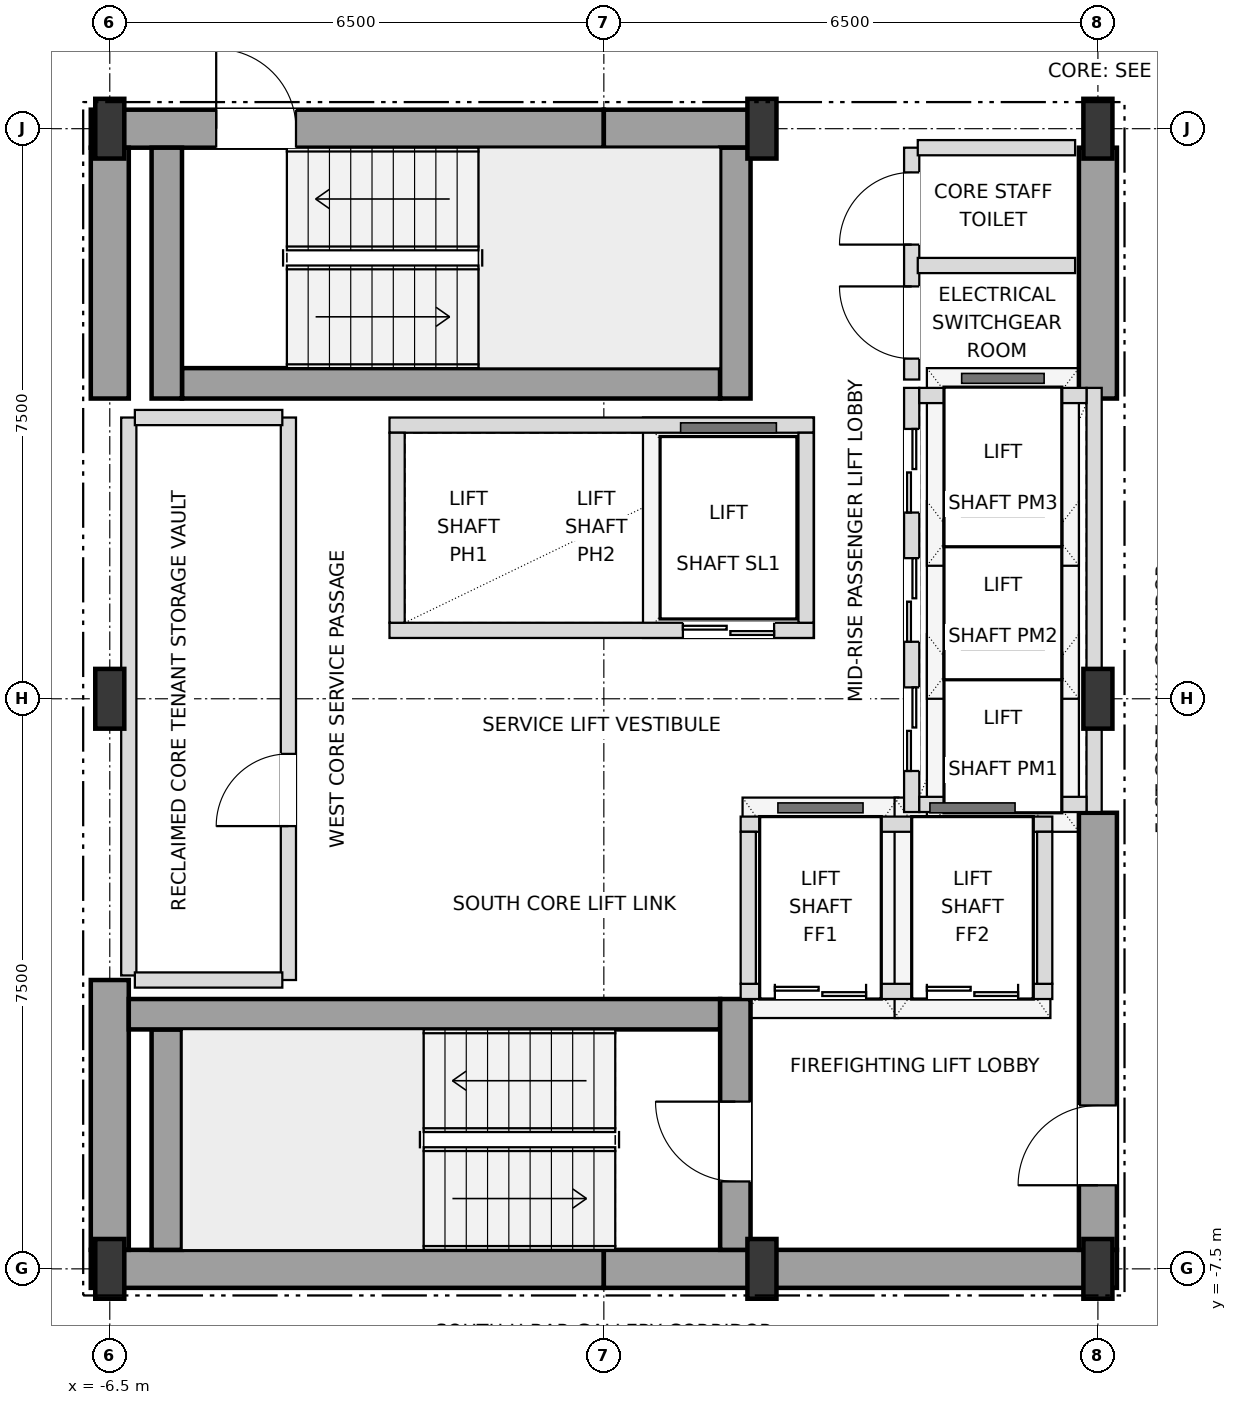
"""IFC4 building model, lengths in metres.
Left out: names, types, materials, properties, quantities, classifications, styles, units other than length and angle.
Written with IfcOpenShell. Run it as: python <this file> out.ifc"""

import sys

from ifc_helpers import new_model, si_unit, direction, frame, frame_2d, origin, origin_2d, place, context, subcontext, project, spatial, rectangle, i_section, extrude, element, fill, save


model = new_model("IFC4")
c1 = context("Model", 3, precision=1e-05, world=origin(), true_north=direction((0.0, 1.0)))
c2 = subcontext(c1, "Body", "Model", "MODEL_VIEW")
j1 = project(units=[si_unit("LENGTHUNIT", "METRE"), si_unit("PLANEANGLEUNIT", "RADIAN")], contexts=[c1])
p1 = place(None, origin())
s1 = spatial("IfcSite", under=j1, at=p1, CompositionType="ELEMENT")
p2 = place(p1, origin())
s2 = spatial("IfcBuilding", under=s1, at=p2, CompositionType="ELEMENT")
p3 = place(p2, frame((0.0, 0.0, 208.8)))
s3 = spatial("IfcBuildingStorey", under=s2, at=p3, CompositionType="ELEMENT", Elevation=208.8)
for number, where, z_axis, x_axis in (
    (1, (-6.5, -7.5, 0.0), (0.0, 0.0, 1.0), (1.0, 0.0, 0.0)),
    (2, (2.08, -7.5, 0.0), (0.0, 0.0, 1.0), (1.0, 0.0, 0.0)),
    (3, (6.5, -7.5, 0.0), (0.0, 0.0, 1.0), (1.0, 0.0, 0.0)),
    (4, (-6.5, 0.0, 0.0), (0.0, 0.0, 1.0), (1.0, 0.0, 0.0)),
    (5, (6.5, 0.0, 0.0), (0.0, 0.0, 1.0), (1.0, 0.0, 0.0)),
    (6, (-6.5, 7.5, 0.0), (0.0, 0.0, 1.0), (1.0, 0.0, 0.0)),
    (7, (2.08, 7.5, 0.0), (0.0, 0.0, 1.0), (1.0, 0.0, 0.0)),
    (8, (6.5, 7.5, 0.0), (0.0, 0.0, 1.0), (1.0, 0.0, 0.0)),
):
    element("IfcColumn", number, at=place(p3, frame(where, z_axis=z_axis, x_axis=x_axis)), inside=s3, PredefinedType="COLUMN", context=c2, shape_type="SweptSolid", body=[
        extrude(i_section(OverallWidth=0.382, OverallDepth=0.786, WebThickness=0.02, FlangeThickness=0.033, at=origin_2d()), origin(), (0.0, 0.0, 1.0), 3.6),
    ])
for number, where, z_axis, x_axis in (
    (9, (-6.75, -7.5, 0.0), (0.0, 0.0, 1.0), (1.0, 0.0, 0.0)),
    (10, (0.0, -7.5, 0.0), (0.0, 0.0, 1.0), (1.0, 0.0, 0.0)),
):
    element("IfcWall", number, at=place(p3, frame(where, z_axis=z_axis, x_axis=x_axis)), inside=s3, PredefinedType="SHEAR", context=c2, shape_type="SweptSolid", body=[
        extrude(rectangle(XDim=6.75, YDim=0.5, at=frame_2d((3.375, 0.0))), origin(), (0.0, 0.0, 1.0), 3.3),
    ])
p4 = place(p3, frame((-6.75, 7.5, 0.0), z_axis=(0.0, 0.0, 1.0), x_axis=(1.0, 0.0, 0.0)))
e11 = element("IfcWall", 11, at=p4, inside=s3, PredefinedType="SHEAR", context=c2, shape_type="SweptSolid", body=[
    extrude(rectangle(XDim=6.75, YDim=0.5, at=frame_2d((3.375, 0.0))), origin(), (0.0, 0.0, 1.0), 3.3),
])
p5 = place(p4, frame((1.65, 0.0, 0.0)))
e12 = element("IfcOpeningElement", 12, at=p5, cuts=e11, PredefinedType="OPENING", context=c2, shape_type="SweptSolid", body=[
    extrude(rectangle(XDim=1.05, YDim=2.15, at=frame_2d((0.525, 1.075))), frame((0.0, 0.26, 0.0), z_axis=(0.0, -1.0, 0.0), x_axis=(1.0, 0.0, 0.0)), (0.0, 0.0, 1.0), 0.52),
])
p6 = place(p3, frame((0.0, 7.5, 0.0), z_axis=(0.0, 0.0, 1.0), x_axis=(1.0, 0.0, 0.0)))
e13 = element("IfcWall", 13, at=p6, inside=s3, PredefinedType="SHEAR", context=c2, shape_type="SweptSolid", body=[
    extrude(rectangle(XDim=2.08, YDim=0.5, at=frame_2d((1.04, 0.0))), origin(), (0.0, 0.0, 1.0), 3.3),
])
p7 = place(p3, frame((-6.5, -7.25, 0.0), z_axis=(0.0, 0.0, 1.0), x_axis=(0.0, 1.0, 0.0)))
e14 = element("IfcWall", 14, at=p7, inside=s3, PredefinedType="SHEAR", context=c2, shape_type="SweptSolid", body=[
    extrude(rectangle(XDim=3.55, YDim=0.5, at=frame_2d((1.775, 0.0))), origin(), (0.0, 0.0, 1.0), 3.3),
])
p8 = place(p3, frame((-6.5, 3.95, 0.0), z_axis=(0.0, 0.0, 1.0), x_axis=(0.0, 1.0, 0.0)))
e15 = element("IfcWall", 15, at=p8, inside=s3, PredefinedType="SHEAR", context=c2, shape_type="SweptSolid", body=[
    extrude(rectangle(XDim=3.3, YDim=0.5, at=frame_2d((1.65, 0.0))), origin(), (0.0, 0.0, 1.0), 3.3),
])
p9 = place(p3, frame((6.5, -7.25, 0.0), z_axis=(0.0, 0.0, 1.0), x_axis=(0.0, 1.0, 0.0)))
e16 = element("IfcWall", 16, at=p9, inside=s3, PredefinedType="SHEAR", context=c2, shape_type="SweptSolid", body=[
    extrude(rectangle(XDim=5.75, YDim=0.5, at=frame_2d((2.875, 0.0))), origin(), (0.0, 0.0, 1.0), 3.3),
])
p10 = place(p9, frame((0.85, 0.0, 0.0)))
e17 = element("IfcOpeningElement", 17, at=p10, cuts=e16, PredefinedType="OPENING", context=c2, shape_type="SweptSolid", body=[
    extrude(rectangle(XDim=1.05, YDim=2.15, at=frame_2d((0.525, 1.075))), frame((0.0, 0.26, 0.0), z_axis=(0.0, -1.0, 0.0), x_axis=(1.0, 0.0, 0.0)), (0.0, 0.0, 1.0), 0.52),
])
p11 = place(p3, frame((6.5, 3.95, 0.0), z_axis=(0.0, 0.0, 1.0), x_axis=(0.0, 1.0, 0.0)))
e18 = element("IfcWall", 18, at=p11, inside=s3, PredefinedType="SHEAR", context=c2, shape_type="SweptSolid", body=[
    extrude(rectangle(XDim=3.3, YDim=0.5, at=frame_2d((1.65, 0.0))), origin(), (0.0, 0.0, 1.0), 3.3),
])
p12 = place(p3, frame((-5.75, -7.25, 0.0), z_axis=(0.0, 0.0, 1.0), x_axis=(0.0, 1.0, 0.0)))
e19 = element("IfcWall", 19, at=p12, inside=s3, PredefinedType="SHEAR", context=c2, shape_type="SweptSolid", body=[
    extrude(rectangle(XDim=2.9, YDim=0.4, at=frame_2d((1.45, 0.0))), origin(), (0.0, 0.0, 1.0), 3.3),
])
p13 = place(p3, frame((-6.25, -4.15, 0.0), z_axis=(0.0, 0.0, 1.0), x_axis=(1.0, 0.0, 0.0)))
e20 = element("IfcWall", 20, at=p13, inside=s3, PredefinedType="SHEAR", context=c2, shape_type="SweptSolid", body=[
    extrude(rectangle(XDim=7.78, YDim=0.4, at=frame_2d((3.89, 0.0))), origin(), (0.0, 0.0, 1.0), 3.3),
])
p14 = place(p3, frame((1.73, -7.25, 0.0), z_axis=(0.0, 0.0, 1.0), x_axis=(0.0, 1.0, 0.0)))
e21 = element("IfcWall", 21, at=p14, inside=s3, PredefinedType="SHEAR", context=c2, shape_type="SweptSolid", body=[
    extrude(rectangle(XDim=3.3, YDim=0.4, at=frame_2d((1.65, 0.0))), origin(), (0.0, 0.0, 1.0), 3.3),
])
p15 = place(p14, frame((0.9, 0.0, 0.0)))
e22 = element("IfcOpeningElement", 22, at=p15, cuts=e21, PredefinedType="OPENING", context=c2, shape_type="SweptSolid", body=[
    extrude(rectangle(XDim=1.05, YDim=2.15, at=frame_2d((0.525, 1.075))), frame((0.0, 0.21, 0.0), z_axis=(0.0, -1.0, 0.0), x_axis=(1.0, 0.0, 0.0)), (0.0, 0.0, 1.0), 0.42),
])
p16 = place(p3, frame((-5.55, 4.15, 0.0), z_axis=(0.0, 0.0, 1.0), x_axis=(1.0, 0.0, 0.0)))
e23 = element("IfcWall", 23, at=p16, inside=s3, PredefinedType="SHEAR", context=c2, shape_type="SweptSolid", body=[
    extrude(rectangle(XDim=7.08, YDim=0.4, at=frame_2d((3.54, 0.0))), origin(), (0.0, 0.0, 1.0), 3.3),
])
for number, where, z_axis, x_axis in (
    (24, (1.73, 3.95, 0.0), (0.0, 0.0, 1.0), (0.0, 1.0, 0.0)),
    (25, (-5.75, 3.95, 0.0), (0.0, 0.0, 1.0), (0.0, 1.0, 0.0)),
):
    element("IfcWall", number, at=place(p3, frame(where, z_axis=z_axis, x_axis=x_axis)), inside=s3, PredefinedType="SHEAR", context=c2, shape_type="SweptSolid", body=[
        extrude(rectangle(XDim=3.3, YDim=0.4, at=frame_2d((1.65, 0.0))), origin(), (0.0, 0.0, 1.0), 3.3),
    ])
p17 = place(p3, frame((4.05, -1.49, 0.0), z_axis=(0.0, 0.0, 1.0), x_axis=(0.0, 1.0, 0.0)))
e26 = element("IfcWall", 26, at=p17, inside=s3, PredefinedType="SOLIDWALL", context=c2, shape_type="SweptSolid", body=[
    extrude(rectangle(XDim=5.58, YDim=0.2, at=frame_2d((2.79, 0.0))), origin(), (0.0, 0.0, 1.0), 3.3),
])
p18 = place(p17, frame((0.54, 0.0, 0.0)))
e27 = element("IfcOpeningElement", 27, at=p18, cuts=e26, PredefinedType="OPENING", context=c2, shape_type="SweptSolid", body=[
    extrude(rectangle(XDim=1.1, YDim=2.15, at=frame_2d((0.55, 1.075))), frame((0.0, 0.11, 0.0), z_axis=(0.0, -1.0, 0.0), x_axis=(1.0, 0.0, 0.0)), (0.0, 0.0, 1.0), 0.22),
])
p19 = place(p17, frame((2.24, 0.0, 0.0)))
e28 = element("IfcOpeningElement", 28, at=p19, cuts=e26, PredefinedType="OPENING", context=c2, shape_type="SweptSolid", body=[
    extrude(rectangle(XDim=1.1, YDim=2.15, at=frame_2d((0.55, 1.075))), frame((0.0, 0.11, 0.0), z_axis=(0.0, -1.0, 0.0), x_axis=(1.0, 0.0, 0.0)), (0.0, 0.0, 1.0), 0.22),
])
p20 = place(p17, frame((3.94, 0.0, 0.0)))
e29 = element("IfcOpeningElement", 29, at=p20, cuts=e26, PredefinedType="OPENING", context=c2, shape_type="SweptSolid", body=[
    extrude(rectangle(XDim=1.1, YDim=2.15, at=frame_2d((0.55, 1.075))), frame((0.0, 0.11, 0.0), z_axis=(0.0, -1.0, 0.0), x_axis=(1.0, 0.0, 0.0)), (0.0, 0.0, 1.0), 0.22),
])
p21 = place(p3, frame((6.45, -1.49, 0.0), z_axis=(0.0, 0.0, 1.0), x_axis=(0.0, 1.0, 0.0)))
e30 = element("IfcWall", 30, at=p21, inside=s3, PredefinedType="SOLIDWALL", context=c2, shape_type="SweptSolid", body=[
    extrude(rectangle(XDim=5.58, YDim=0.2, at=frame_2d((2.79, 0.0))), origin(), (0.0, 0.0, 1.0), 2.746),
])
for number, where, z_axis, x_axis in (
    (31, (4.15, -1.39, 0.0), (0.0, 0.0, 1.0), (1.0, 0.0, 0.0)),
    (32, (4.15, 3.99, 0.0), (0.0, 0.0, 1.0), (1.0, 0.0, 0.0)),
):
    element("IfcWall", number, at=place(p3, frame(where, z_axis=z_axis, x_axis=x_axis)), inside=s3, PredefinedType="SOLIDWALL", context=c2, shape_type="SweptSolid", body=[
        extrude(rectangle(XDim=2.2, YDim=0.2, at=frame_2d((1.1, 0.0))), origin(), (0.0, 0.0, 1.0), 3.3),
    ])
p22 = place(p3, frame((-2.82, 0.9, 0.0), z_axis=(0.0, 0.0, 1.0), x_axis=(1.0, 0.0, 0.0)))
e33 = element("IfcWall", 33, at=p22, inside=s3, PredefinedType="SOLIDWALL", context=c2, shape_type="SweptSolid", body=[
    extrude(rectangle(XDim=5.58, YDim=0.2, at=frame_2d((2.79, 0.0))), origin(), (0.0, 0.0, 1.0), 3.3),
])
p23 = place(p22, frame((3.86, 0.0, 0.0)))
e34 = element("IfcOpeningElement", 34, at=p23, cuts=e33, PredefinedType="OPENING", context=c2, shape_type="SweptSolid", body=[
    extrude(rectangle(XDim=1.2, YDim=2.2, at=frame_2d((0.6, 1.1))), frame((0.0, 0.11, 0.0), z_axis=(0.0, -1.0, 0.0), x_axis=(1.0, 0.0, 0.0)), (0.0, 0.0, 1.0), 0.22),
])
p24 = place(p3, frame((-2.82, 3.6, 0.0), z_axis=(0.0, 0.0, 1.0), x_axis=(1.0, 0.0, 0.0)))
e35 = element("IfcWall", 35, at=p24, inside=s3, PredefinedType="SOLIDWALL", context=c2, shape_type="SweptSolid", body=[
    extrude(rectangle(XDim=5.58, YDim=0.2, at=frame_2d((2.79, 0.0))), origin(), (0.0, 0.0, 1.0), 3.3),
])
for number, where, z_axis, x_axis in (
    (36, (-2.72, 1.0, 0.0), (0.0, 0.0, 1.0), (0.0, 1.0, 0.0)),
    (37, (2.66, 1.0, 0.0), (0.0, 0.0, 1.0), (0.0, 1.0, 0.0)),
):
    element("IfcWall", number, at=place(p3, frame(where, z_axis=z_axis, x_axis=x_axis)), inside=s3, PredefinedType="SOLIDWALL", context=c2, shape_type="SweptSolid", body=[
        extrude(rectangle(XDim=2.5, YDim=0.2, at=frame_2d((1.25, 0.0))), origin(), (0.0, 0.0, 1.0), 3.3),
    ])
p25 = place(p3, frame((1.8, -3.85, 0.0), z_axis=(0.0, 0.0, 1.0), x_axis=(1.0, 0.0, 0.0)))
e38 = element("IfcWall", 38, at=p25, inside=s3, PredefinedType="SOLIDWALL", context=c2, shape_type="SweptSolid", body=[
    extrude(rectangle(XDim=4.1, YDim=0.2, at=frame_2d((2.05, 0.0))), origin(), (0.0, 0.0, 1.0), 3.3),
])
p26 = place(p25, frame((0.45, 0.0, 0.0)))
e39 = element("IfcOpeningElement", 39, at=p26, cuts=e38, PredefinedType="OPENING", context=c2, shape_type="SweptSolid", body=[
    extrude(rectangle(XDim=1.2, YDim=2.2, at=frame_2d((0.6, 1.1))), frame((0.0, 0.11, 0.0), z_axis=(0.0, -1.0, 0.0), x_axis=(1.0, 0.0, 0.0)), (0.0, 0.0, 1.0), 0.22),
])
p27 = place(p25, frame((2.45, 0.0, 0.0)))
e40 = element("IfcOpeningElement", 40, at=p27, cuts=e38, PredefinedType="OPENING", context=c2, shape_type="SweptSolid", body=[
    extrude(rectangle(XDim=1.2, YDim=2.2, at=frame_2d((0.6, 1.1))), frame((0.0, 0.11, 0.0), z_axis=(0.0, -1.0, 0.0), x_axis=(1.0, 0.0, 0.0)), (0.0, 0.0, 1.0), 0.22),
])
p28 = place(p3, frame((1.8, -1.65, 0.0), z_axis=(0.0, 0.0, 1.0), x_axis=(1.0, 0.0, 0.0)))
e41 = element("IfcWall", 41, at=p28, inside=s3, PredefinedType="SOLIDWALL", context=c2, shape_type="SweptSolid", body=[
    extrude(rectangle(XDim=4.1, YDim=0.2, at=frame_2d((2.05, 0.0))), origin(), (0.0, 0.0, 1.0), 3.3),
])
for number, where, z_axis, x_axis in (
    (42, (1.9, -3.75, 0.0), (0.0, 0.0, 1.0), (0.0, 1.0, 0.0)),
    (43, (5.8, -3.75, 0.0), (0.0, 0.0, 1.0), (0.0, 1.0, 0.0)),
):
    element("IfcWall", number, at=place(p3, frame(where, z_axis=z_axis, x_axis=x_axis)), inside=s3, PredefinedType="SOLIDWALL", context=c2, shape_type="SweptSolid", body=[
        extrude(rectangle(XDim=2.0, YDim=0.2, at=frame_2d((1.0, 0.0))), origin(), (0.0, 0.0, 1.0), 3.3),
    ])
p29 = place(p3, frame((-6.25, -3.64, 0.0), z_axis=(0.0, 0.0, 1.0), x_axis=(0.0, 1.0, 0.0)))
e44 = element("IfcWall", 44, at=p29, inside=s3, PredefinedType="SOLIDWALL", context=c2, shape_type="SweptSolid", body=[
    extrude(rectangle(XDim=7.34, YDim=0.2, at=frame_2d((3.67, 0.0))), origin(), (0.0, 0.0, 1.0), 3.3),
])
p30 = place(p3, frame((-4.15, -3.7, 0.0), z_axis=(0.0, 0.0, 1.0), x_axis=(0.0, 1.0, 0.0)))
e45 = element("IfcWall", 45, at=p30, inside=s3, PredefinedType="SOLIDWALL", context=c2, shape_type="SweptSolid", body=[
    extrude(rectangle(XDim=7.4, YDim=0.2, at=frame_2d((3.7, 0.0))), origin(), (0.0, 0.0, 1.0), 3.3),
])
p31 = place(p30, frame((2.025, 0.0, 0.0)))
e46 = element("IfcOpeningElement", 46, at=p31, cuts=e45, PredefinedType="OPENING", context=c2, shape_type="SweptSolid", body=[
    extrude(rectangle(XDim=0.95, YDim=2.15, at=frame_2d((0.475, 1.075))), frame((0.0, 0.11, 0.0), z_axis=(0.0, -1.0, 0.0), x_axis=(1.0, 0.0, 0.0)), (0.0, 0.0, 1.0), 0.22),
])
p32 = place(p3, frame((4.05, 4.2, 0.0), z_axis=(0.0, 0.0, 1.0), x_axis=(0.0, 1.0, 0.0)))
e47 = element("IfcWall", 47, at=p32, inside=s3, PredefinedType="SOLIDWALL", context=c2, shape_type="SweptSolid", body=[
    extrude(rectangle(XDim=3.05, YDim=0.2, at=frame_2d((1.525, 0.0))), origin(), (0.0, 0.0, 1.0), 3.3),
])
p33 = place(p32, frame((0.275, 0.0, 0.0)))
e48 = element("IfcOpeningElement", 48, at=p33, cuts=e47, PredefinedType="OPENING", context=c2, shape_type="SweptSolid", body=[
    extrude(rectangle(XDim=0.95, YDim=2.15, at=frame_2d((0.475, 1.075))), frame((0.0, 0.11, 0.0), z_axis=(0.0, -1.0, 0.0), x_axis=(1.0, 0.0, 0.0)), (0.0, 0.0, 1.0), 0.22),
])
p34 = place(p32, frame((1.775, 0.0, 0.0)))
e49 = element("IfcOpeningElement", 49, at=p34, cuts=e47, PredefinedType="OPENING", context=c2, shape_type="SweptSolid", body=[
    extrude(rectangle(XDim=0.95, YDim=2.15, at=frame_2d((0.475, 1.075))), frame((0.0, 0.11, 0.0), z_axis=(0.0, -1.0, 0.0), x_axis=(1.0, 0.0, 0.0)), (0.0, 0.0, 1.0), 0.22),
])
for number, where, z_axis, x_axis in (
    (50, (-6.17, -3.7, 0.0), (0.0, 0.0, 1.0), (1.0, 0.0, 0.0)),
    (51, (-6.17, 3.7, 0.0), (0.0, 0.0, 1.0), (1.0, 0.0, 0.0)),
):
    element("IfcWall", number, at=place(p3, frame(where, z_axis=z_axis, x_axis=x_axis)), inside=s3, PredefinedType="SOLIDWALL", context=c2, shape_type="SweptSolid", body=[
        extrude(rectangle(XDim=1.94, YDim=0.2, at=frame_2d((0.97, 0.0))), origin(), (0.0, 0.0, 1.0), 3.3),
    ])
for number, where, z_axis, x_axis in (
    (52, (4.13, 5.7, 0.0), (0.0, 0.0, 1.0), (1.0, 0.0, 0.0)),
    (53, (4.13, 7.25, 0.0), (0.0, 0.0, 1.0), (1.0, 0.0, 0.0)),
):
    element("IfcWall", number, at=place(p3, frame(where, z_axis=z_axis, x_axis=x_axis)), inside=s3, PredefinedType="SOLIDWALL", context=c2, shape_type="SweptSolid", body=[
        extrude(rectangle(XDim=2.07, YDim=0.2, at=frame_2d((1.035, 0.0))), origin(), (0.0, 0.0, 1.0), 3.3),
    ])
p35 = place(p10, origin())
e54 = element("IfcDoor", 54, at=p35, inside=s3, OperationType="SINGLE_SWING_LEFT", PredefinedType="DOOR", context=c2, shape_type="SweptSolid", body=[
    extrude(rectangle(XDim=1.05, YDim=2.15, at=frame_2d((0.525, 1.075))), frame((0.0, 0.025, 0.0), z_axis=(0.0, -1.0, 0.0), x_axis=(1.0, 0.0, 0.0)), (0.0, 0.0, 1.0), 0.05),
])
fill(e17, e54)
p36 = place(p15, origin())
e55 = element("IfcDoor", 55, at=p36, inside=s3, OperationType="SINGLE_SWING_RIGHT", PredefinedType="DOOR", context=c2, shape_type="SweptSolid", body=[
    extrude(rectangle(XDim=1.05, YDim=2.15, at=frame_2d((0.525, 1.075))), frame((0.0, 0.025, 0.0), z_axis=(0.0, -1.0, 0.0), x_axis=(1.0, 0.0, 0.0)), (0.0, 0.0, 1.0), 0.05),
])
fill(e22, e55)
p37 = place(p5, origin())
e56 = element("IfcDoor", 56, at=p37, inside=s3, OperationType="SINGLE_SWING_LEFT", PredefinedType="DOOR", context=c2, shape_type="SweptSolid", body=[
    extrude(rectangle(XDim=1.05, YDim=2.15, at=frame_2d((0.525, 1.075))), frame((0.0, 0.025, 0.0), z_axis=(0.0, -1.0, 0.0), x_axis=(1.0, 0.0, 0.0)), (0.0, 0.0, 1.0), 0.05),
])
fill(e12, e56)
p38 = place(p18, origin())
e57 = element("IfcDoor", 57, at=p38, inside=s3, OperationType="DOUBLE_DOOR_SLIDING", PredefinedType="DOOR", context=c2, shape_type="SweptSolid", body=[
    extrude(rectangle(XDim=1.1, YDim=2.15, at=frame_2d((0.55, 1.075))), frame((0.0, 0.025, 0.0), z_axis=(0.0, -1.0, 0.0), x_axis=(1.0, 0.0, 0.0)), (0.0, 0.0, 1.0), 0.05),
])
fill(e27, e57)
p39 = place(p19, origin())
e58 = element("IfcDoor", 58, at=p39, inside=s3, OperationType="DOUBLE_DOOR_SLIDING", PredefinedType="DOOR", context=c2, shape_type="SweptSolid", body=[
    extrude(rectangle(XDim=1.1, YDim=2.15, at=frame_2d((0.55, 1.075))), frame((0.0, 0.025, 0.0), z_axis=(0.0, -1.0, 0.0), x_axis=(1.0, 0.0, 0.0)), (0.0, 0.0, 1.0), 0.05),
])
fill(e28, e58)
p40 = place(p20, origin())
e59 = element("IfcDoor", 59, at=p40, inside=s3, OperationType="DOUBLE_DOOR_SLIDING", PredefinedType="DOOR", context=c2, shape_type="SweptSolid", body=[
    extrude(rectangle(XDim=1.1, YDim=2.15, at=frame_2d((0.55, 1.075))), frame((0.0, 0.025, 0.0), z_axis=(0.0, -1.0, 0.0), x_axis=(1.0, 0.0, 0.0)), (0.0, 0.0, 1.0), 0.05),
])
fill(e29, e59)
p41 = place(p23, origin())
e60 = element("IfcDoor", 60, at=p41, inside=s3, OperationType="DOUBLE_DOOR_SLIDING", PredefinedType="DOOR", context=c2, shape_type="SweptSolid", body=[
    extrude(rectangle(XDim=1.2, YDim=2.2, at=frame_2d((0.6, 1.1))), frame((0.0, 0.025, 0.0), z_axis=(0.0, -1.0, 0.0), x_axis=(1.0, 0.0, 0.0)), (0.0, 0.0, 1.0), 0.05),
])
fill(e34, e60)
p42 = place(p26, origin())
e61 = element("IfcDoor", 61, at=p42, inside=s3, OperationType="DOUBLE_DOOR_SLIDING", PredefinedType="DOOR", context=c2, shape_type="SweptSolid", body=[
    extrude(rectangle(XDim=1.2, YDim=2.2, at=frame_2d((0.6, 1.1))), frame((0.0, 0.025, 0.0), z_axis=(0.0, -1.0, 0.0), x_axis=(1.0, 0.0, 0.0)), (0.0, 0.0, 1.0), 0.05),
])
fill(e39, e61)
p43 = place(p27, origin())
e62 = element("IfcDoor", 62, at=p43, inside=s3, OperationType="DOUBLE_DOOR_SLIDING", PredefinedType="DOOR", context=c2, shape_type="SweptSolid", body=[
    extrude(rectangle(XDim=1.2, YDim=2.2, at=frame_2d((0.6, 1.1))), frame((0.0, 0.025, 0.0), z_axis=(0.0, -1.0, 0.0), x_axis=(1.0, 0.0, 0.0)), (0.0, 0.0, 1.0), 0.05),
])
fill(e40, e62)
p44 = place(p31, origin())
e63 = element("IfcDoor", 63, at=p44, inside=s3, OperationType="SINGLE_SWING_LEFT", PredefinedType="DOOR", context=c2, shape_type="SweptSolid", body=[
    extrude(rectangle(XDim=0.95, YDim=2.15, at=frame_2d((0.475, 1.075))), frame((0.0, 0.025, 0.0), z_axis=(0.0, -1.0, 0.0), x_axis=(1.0, 0.0, 0.0)), (0.0, 0.0, 1.0), 0.05),
])
fill(e46, e63)
p45 = place(p33, origin())
e64 = element("IfcDoor", 64, at=p45, inside=s3, OperationType="SINGLE_SWING_RIGHT", PredefinedType="DOOR", context=c2, shape_type="SweptSolid", body=[
    extrude(rectangle(XDim=0.95, YDim=2.15, at=frame_2d((0.475, 1.075))), frame((0.0, 0.025, 0.0), z_axis=(0.0, -1.0, 0.0), x_axis=(1.0, 0.0, 0.0)), (0.0, 0.0, 1.0), 0.05),
])
fill(e48, e64)
p46 = place(p34, origin())
e65 = element("IfcDoor", 65, at=p46, inside=s3, OperationType="SINGLE_SWING_LEFT", PredefinedType="DOOR", context=c2, shape_type="SweptSolid", body=[
    extrude(rectangle(XDim=0.95, YDim=2.15, at=frame_2d((0.475, 1.075))), frame((0.0, 0.025, 0.0), z_axis=(0.0, -1.0, 0.0), x_axis=(1.0, 0.0, 0.0)), (0.0, 0.0, 1.0), 0.05),
])
fill(e49, e65)
save(model, sys.argv[1])
